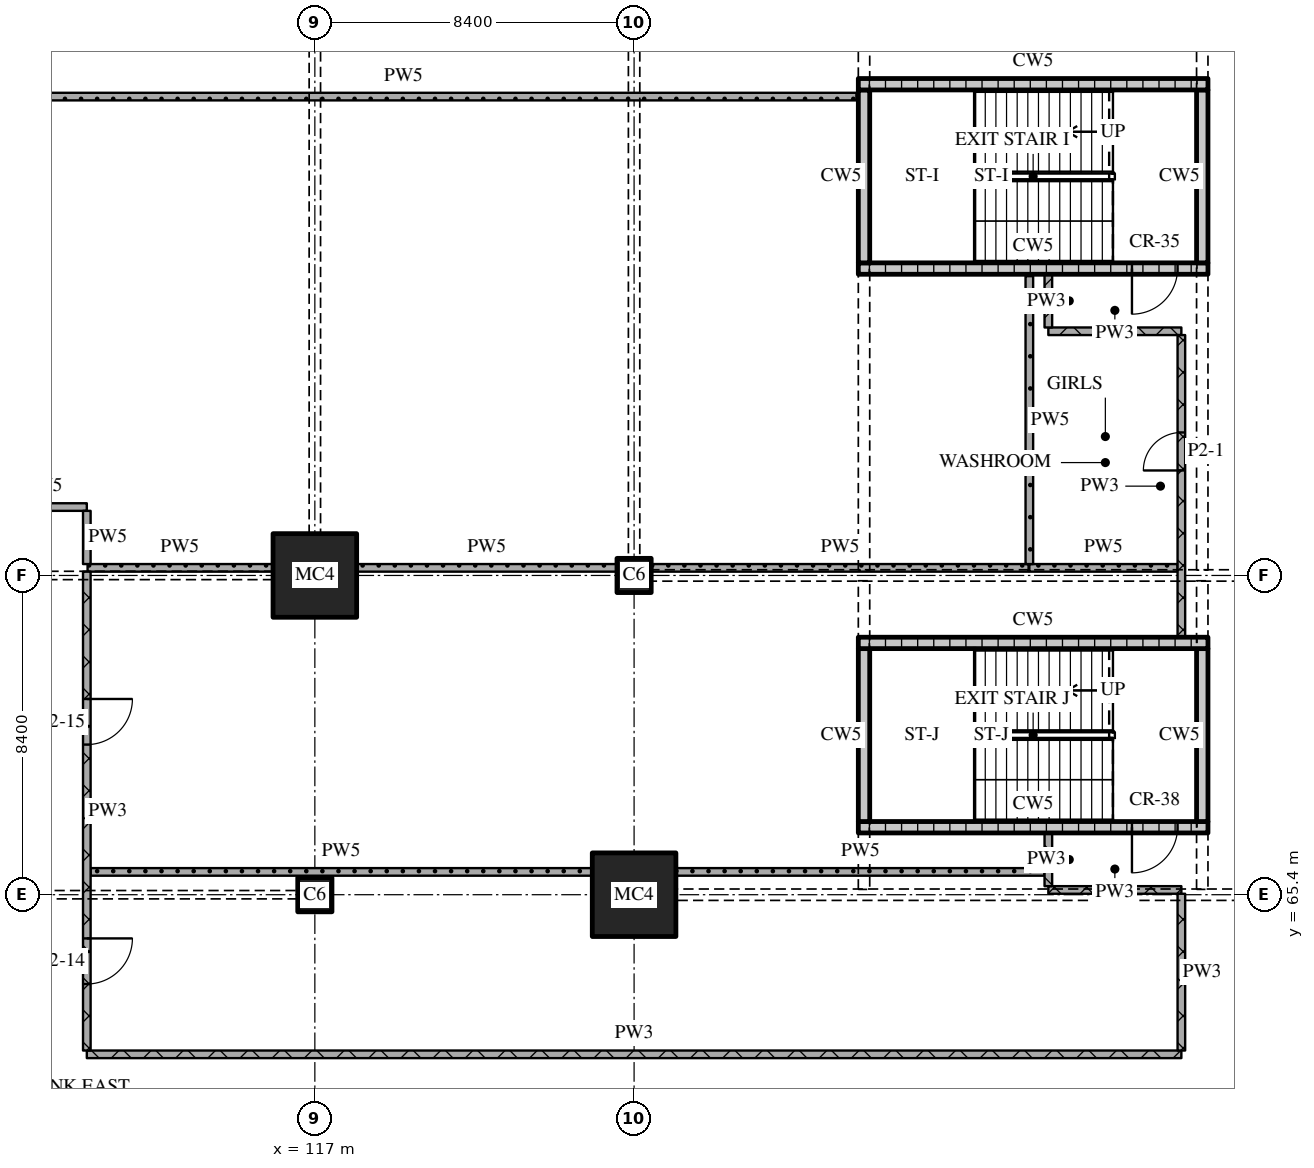
"""IFC4 building model, lengths in metres.
Left out: names, types, materials, properties, quantities, classifications, styles, units other than length and angle.
Written with IfcOpenShell. Run it as: python <this file> out.ifc"""

import sys

from ifc_helpers import new_model, si_unit, direction, frame, frame_2d, origin, origin_2d, place, context, subcontext, project, spatial, rectangle, extrude, element, fill, save


model = new_model("IFC4")
c1 = context("Model", 3, precision=1e-05, world=origin(), true_north=direction((0.0, 1.0)))
c2 = subcontext(c1, "Body", "Model", "MODEL_VIEW")
j1 = project(units=[si_unit("LENGTHUNIT", "METRE"), si_unit("PLANEANGLEUNIT", "RADIAN")], contexts=[c1])
p1 = place(None, origin())
s1 = spatial("IfcSite", under=j1, at=p1, CompositionType="ELEMENT")
p2 = place(p1, origin())
s2 = spatial("IfcBuilding", under=s1, at=p2, CompositionType="ELEMENT")
p3 = place(p2, frame((0.0, 0.0, 14.4)))
s3 = spatial("IfcBuildingStorey", under=s2, at=p3, CompositionType="ELEMENT", Elevation=14.4)
p4 = place(p3, frame((117.0, 65.4, 0.0), z_axis=(0.0, 0.0, 1.0), x_axis=(1.0, 0.0, 0.0)))
e1 = element("IfcColumn", 1, at=p4, inside=s3, PredefinedType="COLUMN", context=c2, shape_type="SweptSolid", body=[
    extrude(rectangle(XDim=0.9, YDim=0.9, at=origin_2d()), origin(), (0.0, 0.0, 1.0), 4.8),
])
for number, where, z_axis, x_axis in (
    (2, (117.0, 73.8, 0.0), (0.0, 0.0, 1.0), (1.0, 0.0, 0.0)),
    (3, (125.4, 65.4, 0.0), (0.0, 0.0, 1.0), (1.0, 0.0, 0.0)),
):
    element("IfcColumn", number, at=place(p3, frame(where, z_axis=z_axis, x_axis=x_axis)), inside=s3, PredefinedType="COLUMN", context=c2, shape_type="SweptSolid", body=[
        extrude(rectangle(XDim=2.2, YDim=2.2, at=origin_2d()), origin(), (0.0, 0.0, 1.0), 4.8),
    ])
p5 = place(p3, frame((125.4, 73.8, 0.0), z_axis=(0.0, 0.0, 1.0), x_axis=(1.0, 0.0, 0.0)))
e4 = element("IfcColumn", 4, at=p5, inside=s3, PredefinedType="COLUMN", context=c2, shape_type="SweptSolid", body=[
    extrude(rectangle(XDim=0.9, YDim=0.9, at=origin_2d()), origin(), (0.0, 0.0, 1.0), 4.8),
])
p6 = place(p3, frame((131.3, 81.875, 0.0), z_axis=(0.0, 0.0, 1.0), x_axis=(1.0, 0.0, 0.0)))
e5 = element("IfcWall", 5, at=p6, inside=s3, PredefinedType="SOLIDWALL", context=c2, shape_type="SweptSolid", body=[
    extrude(rectangle(XDim=9.2, YDim=0.3, at=frame_2d((4.6, 0.0))), origin(), (0.0, 0.0, 1.0), 4.5),
])
p7 = place(p6, frame((7.2, 0.0, 0.0)))
e6 = element("IfcOpeningElement", 6, at=p7, cuts=e5, PredefinedType="OPENING", context=c2, shape_type="SweptSolid", body=[
    extrude(rectangle(XDim=1.2, YDim=2.1, at=frame_2d((0.6, 1.05))), frame((0.0, 0.16, 0.0), z_axis=(0.0, -1.0, 0.0), x_axis=(1.0, 0.0, 0.0)), (0.0, 0.0, 1.0), 0.32),
])
for number, where, z_axis, x_axis in (
    (7, (131.45, 82.025, 0.0), (0.0, 0.0, 1.0), (0.0, 1.0, 0.0)),
    (8, (140.35, 82.025, 0.0), (0.0, 0.0, 1.0), (0.0, 1.0, 0.0)),
):
    element("IfcWall", number, at=place(p3, frame(where, z_axis=z_axis, x_axis=x_axis)), inside=s3, PredefinedType="SOLIDWALL", context=c2, shape_type="SweptSolid", body=[
        extrude(rectangle(XDim=4.55, YDim=0.3, at=frame_2d((2.275, 0.0))), origin(), (0.0, 0.0, 1.0), 4.5),
    ])
p8 = place(p3, frame((131.3, 86.725, 0.0), z_axis=(0.0, 0.0, 1.0), x_axis=(1.0, 0.0, 0.0)))
e9 = element("IfcWall", 9, at=p8, inside=s3, PredefinedType="SOLIDWALL", context=c2, shape_type="SweptSolid", body=[
    extrude(rectangle(XDim=9.2, YDim=0.3, at=frame_2d((4.6, 0.0))), origin(), (0.0, 0.0, 1.0), 4.5),
])
p9 = place(p3, frame((131.3, 67.175, 0.0), z_axis=(0.0, 0.0, 1.0), x_axis=(1.0, 0.0, 0.0)))
e10 = element("IfcWall", 10, at=p9, inside=s3, PredefinedType="SOLIDWALL", context=c2, shape_type="SweptSolid", body=[
    extrude(rectangle(XDim=9.2, YDim=0.3, at=frame_2d((4.6, 0.0))), origin(), (0.0, 0.0, 1.0), 4.5),
])
p10 = place(p9, frame((7.2, 0.0, 0.0)))
e11 = element("IfcOpeningElement", 11, at=p10, cuts=e10, PredefinedType="OPENING", context=c2, shape_type="SweptSolid", body=[
    extrude(rectangle(XDim=1.2, YDim=2.1, at=frame_2d((0.6, 1.05))), frame((0.0, 0.16, 0.0), z_axis=(0.0, -1.0, 0.0), x_axis=(1.0, 0.0, 0.0)), (0.0, 0.0, 1.0), 0.32),
])
for number, where, z_axis, x_axis in (
    (12, (131.45, 67.325, 0.0), (0.0, 0.0, 1.0), (0.0, 1.0, 0.0)),
    (13, (140.35, 67.325, 0.0), (0.0, 0.0, 1.0), (0.0, 1.0, 0.0)),
):
    element("IfcWall", number, at=place(p3, frame(where, z_axis=z_axis, x_axis=x_axis)), inside=s3, PredefinedType="SOLIDWALL", context=c2, shape_type="SweptSolid", body=[
        extrude(rectangle(XDim=4.55, YDim=0.3, at=frame_2d((2.275, 0.0))), origin(), (0.0, 0.0, 1.0), 4.5),
    ])
p11 = place(p3, frame((131.3, 72.025, 0.0), z_axis=(0.0, 0.0, 1.0), x_axis=(1.0, 0.0, 0.0)))
e14 = element("IfcWall", 14, at=p11, inside=s3, PredefinedType="SOLIDWALL", context=c2, shape_type="SweptSolid", body=[
    extrude(rectangle(XDim=9.2, YDim=0.3, at=frame_2d((4.6, 0.0))), origin(), (0.0, 0.0, 1.0), 4.5),
])
p12 = place(p3, frame((111.0, 61.2, 0.0), z_axis=(0.0, 0.0, 1.0), x_axis=(1.0, 0.0, 0.0)))
e15 = element("IfcWall", 15, at=p12, inside=s3, PredefinedType="PARTITIONING", context=c2, shape_type="SweptSolid", body=[
    extrude(rectangle(XDim=28.8, YDim=0.2, at=frame_2d((14.4, 0.0))), origin(), (0.0, 0.0, 1.0), 4.5),
])
p13 = place(p3, frame((136.3, 65.525, 0.0), z_axis=(0.0, 0.0, 1.0), x_axis=(1.0, 0.0, 0.0)))
e16 = element("IfcWall", 16, at=p13, inside=s3, PredefinedType="PARTITIONING", context=c2, shape_type="SweptSolid", body=[
    extrude(rectangle(XDim=3.5, YDim=0.2, at=frame_2d((1.75, 0.0))), origin(), (0.0, 0.0, 1.0), 3.51),
])
p14 = place(p3, frame((111.1, 66.0, 0.0), z_axis=(0.0, 0.0, 1.0), x_axis=(1.0, 0.0, 0.0)))
e17 = element("IfcWall", 17, at=p14, inside=s3, PredefinedType="PARTITIONING", context=c2, shape_type="SweptSolid", body=[
    extrude(rectangle(XDim=13.18, YDim=0.2, at=frame_2d((6.59, 0.0))), origin(), (0.0, 0.0, 1.0), 4.5),
])
p15 = place(p3, frame((126.52, 66.0, 0.0), z_axis=(0.0, 0.0, 1.0), x_axis=(1.0, 0.0, 0.0)))
e18 = element("IfcWall", 18, at=p15, inside=s3, PredefinedType="PARTITIONING", context=c2, shape_type="SweptSolid", body=[
    extrude(rectangle(XDim=9.68, YDim=0.2, at=frame_2d((4.84, 0.0))), origin(), (0.0, 0.0, 1.0), 4.5),
])
p16 = place(p3, frame((111.02, 74.0, 0.0), z_axis=(0.0, 0.0, 1.0), x_axis=(1.0, 0.0, 0.0)))
e19 = element("IfcWall", 19, at=p16, inside=s3, PredefinedType="PARTITIONING", context=c2, shape_type="SweptSolid", body=[
    extrude(rectangle(XDim=4.86, YDim=0.2, at=frame_2d((2.43, 0.0))), origin(), (0.0, 0.0, 1.0), 3.9),
])
p17 = place(p3, frame((118.12, 74.0, 0.0), z_axis=(0.0, 0.0, 1.0), x_axis=(1.0, 0.0, 0.0)))
e20 = element("IfcWall", 20, at=p17, inside=s3, PredefinedType="PARTITIONING", context=c2, shape_type="SweptSolid", body=[
    extrude(rectangle(XDim=6.81, YDim=0.2, at=frame_2d((3.405, 0.0))), origin(), (0.0, 0.0, 1.0), 4.01),
])
p18 = place(p3, frame((125.87, 74.0, 0.0), z_axis=(0.0, 0.0, 1.0), x_axis=(1.0, 0.0, 0.0)))
e21 = element("IfcWall", 21, at=p18, inside=s3, PredefinedType="PARTITIONING", context=c2, shape_type="SweptSolid", body=[
    extrude(rectangle(XDim=9.91, YDim=0.2, at=frame_2d((4.955, 0.0))), origin(), (0.0, 0.0, 1.0), 3.51),
])
p19 = place(p3, frame((135.8, 74.0, 0.0), z_axis=(0.0, 0.0, 1.0), x_axis=(1.0, 0.0, 0.0)))
e22 = element("IfcWall", 22, at=p19, inside=s3, PredefinedType="PARTITIONING", context=c2, shape_type="SweptSolid", body=[
    extrude(rectangle(XDim=3.9, YDim=0.2, at=frame_2d((1.95, 0.0))), origin(), (0.0, 0.0, 1.0), 3.51),
])
p20 = place(p3, frame((108.7, 75.6, 0.0), z_axis=(0.0, 0.0, 1.0), x_axis=(1.0, 0.0, 0.0)))
e23 = element("IfcWall", 23, at=p20, inside=s3, PredefinedType="PARTITIONING", context=c2, shape_type="SweptSolid", body=[
    extrude(rectangle(XDim=2.3, YDim=0.2, at=frame_2d((1.15, 0.0))), origin(), (0.0, 0.0, 1.0), 4.5),
])
p21 = place(p3, frame((136.3, 80.225, 0.0), z_axis=(0.0, 0.0, 1.0), x_axis=(1.0, 0.0, 0.0)))
e24 = element("IfcWall", 24, at=p21, inside=s3, PredefinedType="PARTITIONING", context=c2, shape_type="SweptSolid", body=[
    extrude(rectangle(XDim=3.5, YDim=0.2, at=frame_2d((1.75, 0.0))), origin(), (0.0, 0.0, 1.0), 4.5),
])
p22 = place(p3, frame((107.42, 86.4, 0.0), z_axis=(0.0, 0.0, 1.0), x_axis=(1.0, 0.0, 0.0)))
e25 = element("IfcWall", 25, at=p22, inside=s3, PredefinedType="PARTITIONING", context=c2, shape_type="SweptSolid", body=[
    extrude(rectangle(XDim=23.83, YDim=0.2, at=frame_2d((11.915, 0.0))), origin(), (0.0, 0.0, 1.0), 4.5),
])
p23 = place(p3, frame((111.0, 73.9, 0.0), z_axis=(0.0, 0.0, 1.0), x_axis=(0.0, -1.0, 0.0)))
e26 = element("IfcWall", 26, at=p23, inside=s3, PredefinedType="PARTITIONING", context=c2, shape_type="SweptSolid", body=[
    extrude(rectangle(XDim=12.6, YDim=0.2, at=frame_2d((6.3, 0.0))), origin(), (0.0, 0.0, 1.0), 4.5),
])
p24 = place(p23, frame((3.35, 0.0, 0.0)))
e27 = element("IfcOpeningElement", 27, at=p24, cuts=e26, PredefinedType="OPENING", context=c2, shape_type="SweptSolid", body=[
    extrude(rectangle(XDim=1.2, YDim=2.1, at=frame_2d((0.6, 1.05))), frame((0.0, 0.11, 0.0), z_axis=(0.0, -1.0, 0.0), x_axis=(1.0, 0.0, 0.0)), (0.0, 0.0, 1.0), 0.22),
])
p25 = place(p23, frame((9.65, 0.0, 0.0)))
e28 = element("IfcOpeningElement", 28, at=p25, cuts=e26, PredefinedType="OPENING", context=c2, shape_type="SweptSolid", body=[
    extrude(rectangle(XDim=1.2, YDim=2.1, at=frame_2d((0.6, 1.05))), frame((0.0, 0.11, 0.0), z_axis=(0.0, -1.0, 0.0), x_axis=(1.0, 0.0, 0.0)), (0.0, 0.0, 1.0), 0.22),
])
p26 = place(p3, frame((111.0, 75.5, 0.0), z_axis=(0.0, 0.0, 1.0), x_axis=(0.0, -1.0, 0.0)))
e29 = element("IfcWall", 29, at=p26, inside=s3, PredefinedType="PARTITIONING", context=c2, shape_type="SweptSolid", body=[
    extrude(rectangle(XDim=1.4, YDim=0.2, at=frame_2d((0.7, 0.0))), origin(), (0.0, 0.0, 1.0), 4.5),
])
p27 = place(p3, frame((135.8, 81.675, 0.0), z_axis=(0.0, 0.0, 1.0), x_axis=(0.0, -1.0, 0.0)))
e30 = element("IfcWall", 30, at=p27, inside=s3, PredefinedType="PARTITIONING", context=c2, shape_type="SweptSolid", body=[
    extrude(rectangle(XDim=7.575, YDim=0.2, at=frame_2d((3.788, 0.0))), origin(), (0.0, 0.0, 1.0), 4.5),
])
p28 = place(p3, frame((136.3, 67.025, 0.0), z_axis=(0.0, 0.0, 1.0), x_axis=(0.0, -1.0, 0.0)))
e31 = element("IfcWall", 31, at=p28, inside=s3, PredefinedType="PARTITIONING", context=c2, shape_type="SweptSolid", body=[
    extrude(rectangle(XDim=1.4, YDim=0.2, at=frame_2d((0.7, 0.0))), origin(), (0.0, 0.0, 1.0), 4.5),
])
p29 = place(p3, frame((136.3, 81.725, 0.0), z_axis=(0.0, 0.0, 1.0), x_axis=(0.0, -1.0, 0.0)))
e32 = element("IfcWall", 32, at=p29, inside=s3, PredefinedType="PARTITIONING", context=c2, shape_type="SweptSolid", body=[
    extrude(rectangle(XDim=1.4, YDim=0.2, at=frame_2d((0.7, 0.0))), origin(), (0.0, 0.0, 1.0), 4.5),
])
p30 = place(p3, frame((139.8, 65.425, 0.0), z_axis=(0.0, 0.0, 1.0), x_axis=(0.0, -1.0, 0.0)))
e33 = element("IfcWall", 33, at=p30, inside=s3, PredefinedType="PARTITIONING", context=c2, shape_type="SweptSolid", body=[
    extrude(rectangle(XDim=4.125, YDim=0.2, at=frame_2d((2.062, 0.0))), origin(), (0.0, 0.0, 1.0), 4.5),
])
p31 = place(p3, frame((139.8, 72.175, 0.0), z_axis=(0.0, 0.0, 1.0), x_axis=(0.0, 1.0, 0.0)))
e34 = element("IfcWall", 34, at=p31, inside=s3, PredefinedType="PARTITIONING", context=c2, shape_type="SweptSolid", body=[
    extrude(rectangle(XDim=7.95, YDim=0.2, at=frame_2d((3.975, 0.0))), origin(), (0.0, 0.0, 1.0), 4.5),
])
p32 = place(p31, frame((4.387, 0.0, 0.0)))
e35 = element("IfcOpeningElement", 35, at=p32, cuts=e34, PredefinedType="OPENING", context=c2, shape_type="SweptSolid", body=[
    extrude(rectangle(XDim=1.0, YDim=2.1, at=frame_2d((0.5, 1.05))), frame((0.0, 0.11, 0.0), z_axis=(0.0, -1.0, 0.0), x_axis=(1.0, 0.0, 0.0)), (0.0, 0.0, 1.0), 0.22),
])
p33 = place(p7, origin())
e36 = element("IfcDoor", 36, at=p33, inside=s3, OperationType="SINGLE_SWING_RIGHT", PredefinedType="DOOR", context=c2, shape_type="SweptSolid", body=[
    extrude(rectangle(XDim=1.2, YDim=2.1, at=frame_2d((0.6, 1.05))), frame((0.0, 0.025, 0.0), z_axis=(0.0, -1.0, 0.0), x_axis=(1.0, 0.0, 0.0)), (0.0, 0.0, 1.0), 0.05),
])
fill(e6, e36)
p34 = place(p10, origin())
e37 = element("IfcDoor", 37, at=p34, inside=s3, OperationType="SINGLE_SWING_RIGHT", PredefinedType="DOOR", context=c2, shape_type="SweptSolid", body=[
    extrude(rectangle(XDim=1.2, YDim=2.1, at=frame_2d((0.6, 1.05))), frame((0.0, 0.025, 0.0), z_axis=(0.0, -1.0, 0.0), x_axis=(1.0, 0.0, 0.0)), (0.0, 0.0, 1.0), 0.05),
])
fill(e11, e37)
p35 = place(p24, origin())
e38 = element("IfcDoor", 38, at=p35, inside=s3, OperationType="SINGLE_SWING_LEFT", PredefinedType="DOOR", context=c2, shape_type="SweptSolid", body=[
    extrude(rectangle(XDim=1.2, YDim=2.1, at=frame_2d((0.6, 1.05))), frame((0.0, 0.025, 0.0), z_axis=(0.0, -1.0, 0.0), x_axis=(1.0, 0.0, 0.0)), (0.0, 0.0, 1.0), 0.05),
])
fill(e27, e38)
p36 = place(p25, origin())
e39 = element("IfcDoor", 39, at=p36, inside=s3, OperationType="SINGLE_SWING_LEFT", PredefinedType="DOOR", context=c2, shape_type="SweptSolid", body=[
    extrude(rectangle(XDim=1.2, YDim=2.1, at=frame_2d((0.6, 1.05))), frame((0.0, 0.025, 0.0), z_axis=(0.0, -1.0, 0.0), x_axis=(1.0, 0.0, 0.0)), (0.0, 0.0, 1.0), 0.05),
])
fill(e28, e39)
p37 = place(p32, origin())
e40 = element("IfcDoor", 40, at=p37, inside=s3, OperationType="SINGLE_SWING_LEFT", PredefinedType="DOOR", context=c2, shape_type="SweptSolid", body=[
    extrude(rectangle(XDim=1.0, YDim=2.1, at=frame_2d((0.5, 1.05))), frame((0.0, 0.025, 0.0), z_axis=(0.0, -1.0, 0.0), x_axis=(1.0, 0.0, 0.0)), (0.0, 0.0, 1.0), 0.05),
])
fill(e35, e40)
save(model, sys.argv[1])
